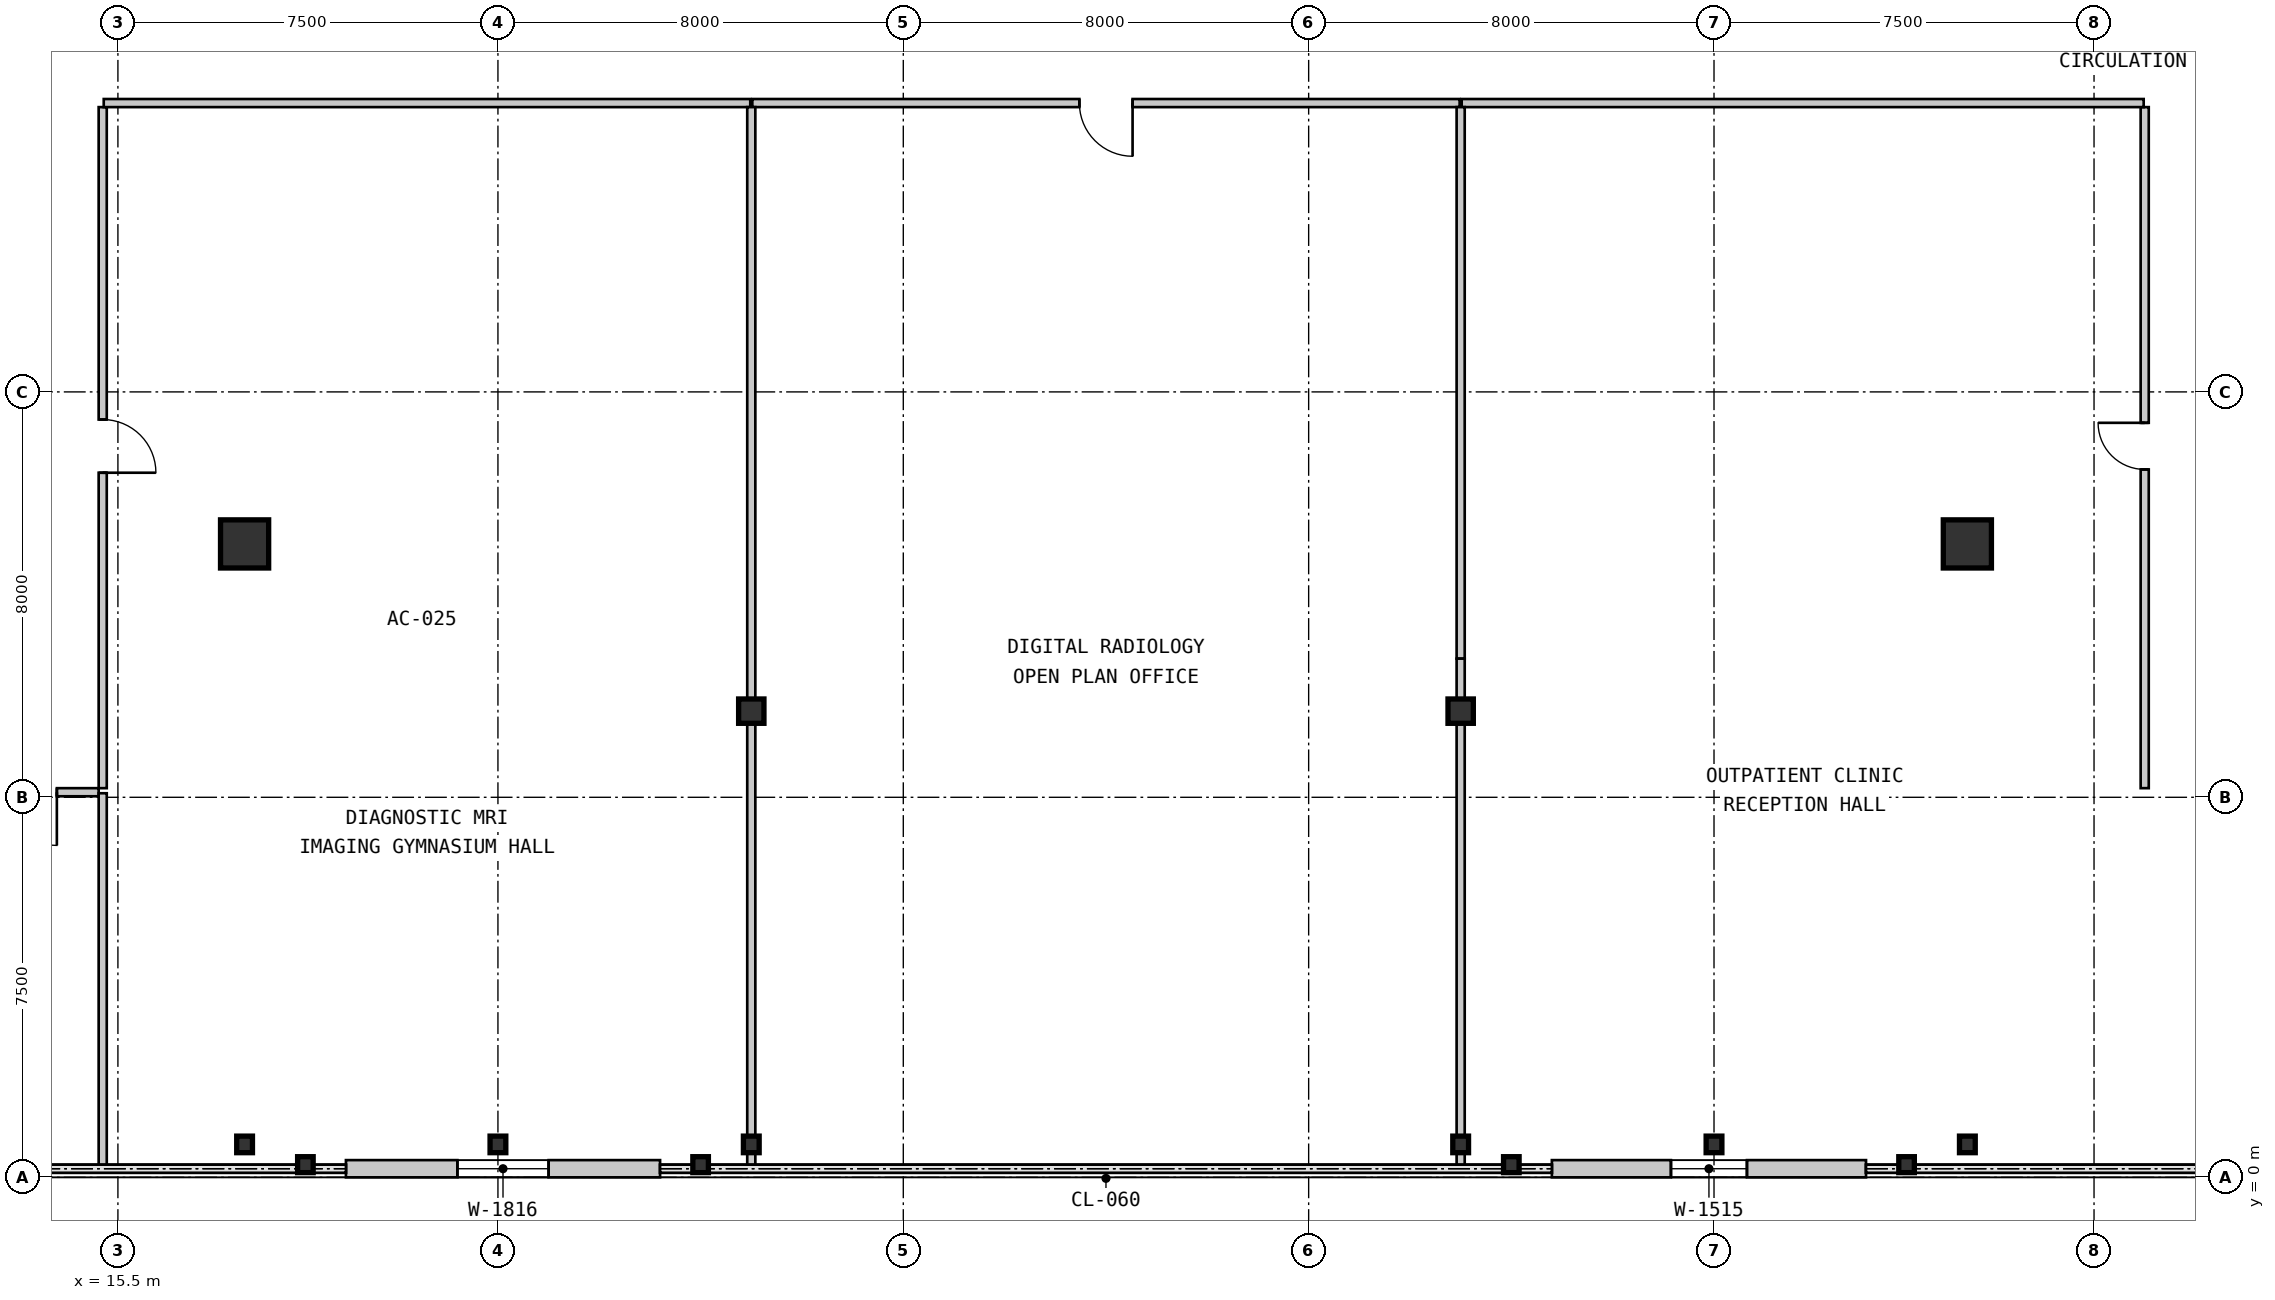
"""IFC4 building model, lengths in metres.
Left out: names, types, materials, properties, quantities, classifications, styles, units other than length and angle.
Written with IfcOpenShell. Run it as: python <this file> out.ifc"""

import sys

from ifc_helpers import new_model, si_unit, direction, frame, frame_2d, origin, origin_2d, place, context, subcontext, project, spatial, rectangle, i_section, extrude, source, transform, mapped, element, fill, save


model = new_model("IFC4")
c1 = context("Model", 3, precision=1e-05, world=origin(), true_north=direction((0.0, 1.0)))
c2 = subcontext(c1, "Body", "Model", "MODEL_VIEW")
j1 = project(units=[si_unit("LENGTHUNIT", "METRE"), si_unit("PLANEANGLEUNIT", "RADIAN")], contexts=[c1])
p1 = place(None, origin())
s1 = spatial("IfcSite", under=j1, at=p1, CompositionType="ELEMENT")
p2 = place(p1, origin())
s2 = spatial("IfcBuilding", under=s1, at=p2, CompositionType="ELEMENT")
p3 = place(p2, frame((0.0, 0.0, 4.55)))
s3 = spatial("IfcBuildingStorey", under=s2, at=p3, CompositionType="ELEMENT", Elevation=4.55)
m1 = source(origin(), c2, "Body", "SweptSolid", [
    extrude(i_section(OverallWidth=0.5, OverallDepth=0.48, WebThickness=0.028, FlangeThickness=0.044, at=origin_2d()), origin(), (0.0, 0.0, 1.0), 3.85),
])
for number, where, z_axis, x_axis in (
    (1, (28.0, 9.2, 0.0), (0.0, 0.0, 1.0), (1.0, 0.0, 0.0)),
    (2, (42.0, 9.2, 0.0), (0.0, 0.0, 1.0), (1.0, 0.0, 0.0)),
):
    element("IfcColumn", number, at=place(p3, frame(where, z_axis=z_axis, x_axis=x_axis)), inside=s3, PredefinedType="COLUMN", context=c2, shape_type="MappedRepresentation", body=[
        mapped(m1, transform((0.0, 0.0, 0.0), scale=1.0)),
    ])
m2 = source(origin(), c2, "Body", "SweptSolid", [
    extrude(rectangle(XDim=0.95, YDim=0.95, at=origin_2d()), origin(), (0.0, 0.0, 1.0), 3.85),
])
for number, where, z_axis, x_axis in (
    (3, (18.0, 12.5, 0.0), (0.0, 0.0, 1.0), (1.0, 0.0, 0.0)),
    (4, (52.0, 12.5, 0.0), (0.0, 0.0, 1.0), (1.0, 0.0, 0.0)),
):
    element("IfcColumn", number, at=place(p3, frame(where, z_axis=z_axis, x_axis=x_axis)), inside=s3, PredefinedType="COLUMN", context=c2, shape_type="MappedRepresentation", body=[
        mapped(m2, transform((0.0, 0.0, 0.0), scale=1.0)),
    ])
m3 = source(origin(), c2, "Body", "SweptSolid", [
    extrude(i_section(OverallWidth=0.311, OverallDepth=0.327, WebThickness=0.016, FlangeThickness=0.025, at=origin_2d()), origin(), (0.0, 0.0, 1.0), 3.85),
])
for number, where, z_axis, x_axis in (
    (5, (28.0, 0.65, 0.0), (0.0, 0.0, 1.0), (1.0, 0.0, 0.0)),
    (6, (42.0, 0.65, 0.0), (0.0, 0.0, 1.0), (1.0, 0.0, 0.0)),
    (7, (18.0, 0.65, 0.0), (0.0, 0.0, 1.0), (1.0, 0.0, 0.0)),
    (8, (23.0, 0.65, 0.0), (0.0, 0.0, 1.0), (1.0, 0.0, 0.0)),
    (9, (47.0, 0.65, 0.0), (0.0, 0.0, 1.0), (1.0, 0.0, 0.0)),
    (10, (52.0, 0.65, 0.0), (0.0, 0.0, 1.0), (1.0, 0.0, 0.0)),
):
    element("IfcColumn", number, at=place(p3, frame(where, z_axis=z_axis, x_axis=x_axis)), inside=s3, PredefinedType="COLUMN", context=c2, shape_type="MappedRepresentation", body=[
        mapped(m3, transform((0.0, 0.0, 0.0), scale=1.0)),
    ])
m4 = source(origin(), c2, "Body", "SweptSolid", [
    extrude(i_section(OverallWidth=0.307, OverallDepth=0.315, WebThickness=0.012, FlangeThickness=0.019, at=origin_2d()), origin(), (0.0, 0.0, 1.0), 3.85),
])
for number, where, z_axis, x_axis in (
    (11, (19.2, 0.25, 0.0), (0.0, 0.0, 1.0), (1.0, 0.0, 0.0)),
    (12, (27.0, 0.25, 0.0), (0.0, 0.0, 1.0), (1.0, 0.0, 0.0)),
    (13, (43.0, 0.25, 0.0), (0.0, 0.0, 1.0), (1.0, 0.0, 0.0)),
    (14, (50.8, 0.25, 0.0), (0.0, 0.0, 1.0), (1.0, 0.0, 0.0)),
):
    element("IfcColumn", number, at=place(p3, frame(where, z_axis=z_axis, x_axis=x_axis)), inside=s3, PredefinedType="PILASTER", context=c2, shape_type="MappedRepresentation", body=[
        mapped(m4, transform((0.0, 0.0, 0.0), scale=1.0)),
    ])
m5 = source(origin(), c2, "Body", "SweptSolid", [
    extrude(rectangle(XDim=6.2, YDim=0.34, at=frame_2d((3.1, 0.0))), origin(), (0.0, 0.0, 1.0), 3.59),
])
p4 = place(p3, frame((20.0, 0.17, 0.0), z_axis=(0.0, 0.0, 1.0), x_axis=(1.0, 0.0, 0.0)))
e15 = element("IfcWall", 15, at=p4, inside=s3, PredefinedType="SOLIDWALL", context=c2, shape_type="MappedRepresentation", body=[
    mapped(m5, transform((0.0, 0.0, 0.0), scale=1.0)),
])
m6 = source(origin(), c2, "Body", "SweptSolid", [
    extrude(rectangle(XDim=1.8, YDim=1.6, at=frame_2d((0.9, 0.8))), frame((0.0, 0.18, 0.0), z_axis=(0.0, -1.0, 0.0), x_axis=(1.0, 0.0, 0.0)), (0.0, 0.0, 1.0), 0.36),
])
p5 = place(p4, frame((2.2, 0.0, 0.9)))
e16 = element("IfcOpeningElement", 16, at=p5, cuts=e15, PredefinedType="OPENING", context=c2, shape_type="MappedRepresentation", body=[
    mapped(m6, transform((0.0, 0.0, 0.0), scale=1.0)),
])
p6 = place(p3, frame((43.8, 0.17, 0.0), z_axis=(0.0, 0.0, 1.0), x_axis=(1.0, 0.0, 0.0)))
e17 = element("IfcWall", 17, at=p6, inside=s3, PredefinedType="SOLIDWALL", context=c2, shape_type="MappedRepresentation", body=[
    mapped(m5, transform((0.0, 0.0, 0.0), scale=1.0)),
])
m7 = source(origin(), c2, "Body", "SweptSolid", [
    extrude(rectangle(XDim=1.5, YDim=1.5, at=frame_2d((0.75, 0.75))), frame((0.0, 0.18, 0.0), z_axis=(0.0, -1.0, 0.0), x_axis=(1.0, 0.0, 0.0)), (0.0, 0.0, 1.0), 0.36),
])
p7 = place(p6, frame((2.35, 0.0, 0.9)))
e18 = element("IfcOpeningElement", 18, at=p7, cuts=e17, PredefinedType="OPENING", context=c2, shape_type="MappedRepresentation", body=[
    mapped(m7, transform((0.0, 0.0, 0.0), scale=1.0)),
])
m8 = source(origin(), c2, "Body", "SweptSolid", [
    extrude(rectangle(XDim=13.44, YDim=0.16, at=frame_2d((6.72, 0.0))), origin(), (0.0, 0.0, 1.0), 3.59),
])
p8 = place(p3, frame((15.2, 21.12, 0.0), z_axis=(0.0, 0.0, 1.0), x_axis=(0.0, -1.0, 0.0)))
e19 = element("IfcWall", 19, at=p8, inside=s3, PredefinedType="PARTITIONING", context=c2, shape_type="MappedRepresentation", body=[
    mapped(m8, transform((0.0, 0.0, 0.0), scale=1.0)),
])
m9 = source(origin(), c2, "Body", "SweptSolid", [
    extrude(rectangle(XDim=1.05, YDim=2.1, at=frame_2d((0.525, 1.05))), frame((0.0, 0.09, 0.0), z_axis=(0.0, -1.0, 0.0), x_axis=(1.0, 0.0, 0.0)), (0.0, 0.0, 1.0), 0.18),
])
p9 = place(p8, frame((6.165, 0.0, 0.0)))
e20 = element("IfcOpeningElement", 20, at=p9, cuts=e19, PredefinedType="OPENING", context=c2, shape_type="MappedRepresentation", body=[
    mapped(m9, transform((0.0, 0.0, 0.0), scale=1.0)),
])
m10 = source(origin(), c2, "Body", "SweptSolid", [
    extrude(rectangle(XDim=12.76, YDim=0.16, at=frame_2d((6.38, 0.0))), origin(), (0.0, 0.0, 1.0), 3.59),
])
p10 = place(p3, frame((27.98, 21.2, 0.0), z_axis=(0.0, 0.0, 1.0), x_axis=(-1.0, 0.0, 0.0)))
e21 = element("IfcWall", 21, at=p10, inside=s3, PredefinedType="PARTITIONING", context=c2, shape_type="MappedRepresentation", body=[
    mapped(m10, transform((0.0, 0.0, 0.0), scale=1.0)),
])
m11 = source(origin(), c2, "Body", "SweptSolid", [
    extrude(rectangle(XDim=13.959, YDim=0.16, at=frame_2d((6.98, 0.0))), origin(), (0.0, 0.0, 1.0), 3.59),
])
p11 = place(p3, frame((41.98, 21.2, 0.0), z_axis=(0.0, 0.0, 1.0), x_axis=(-1.0, 0.0, 0.0)))
e22 = element("IfcWall", 22, at=p11, inside=s3, PredefinedType="PARTITIONING", context=c2, shape_type="MappedRepresentation", body=[
    mapped(m11, transform((0.0, 0.0, 0.0), scale=1.0)),
])
p12 = place(p11, frame((6.455, 0.0, 0.0)))
e23 = element("IfcOpeningElement", 23, at=p12, cuts=e22, PredefinedType="OPENING", context=c2, shape_type="MappedRepresentation", body=[
    mapped(m9, transform((0.0, 0.0, 0.0), scale=1.0)),
])
p13 = place(p3, frame((55.5, 7.68, 0.0), z_axis=(0.0, 0.0, 1.0), x_axis=(0.0, 1.0, 0.0)))
e24 = element("IfcWall", 24, at=p13, inside=s3, PredefinedType="PARTITIONING", context=c2, shape_type="MappedRepresentation", body=[
    mapped(m8, transform((0.0, 0.0, 0.0), scale=1.0)),
])
m12 = source(origin(), c2, "Body", "SweptSolid", [
    extrude(rectangle(XDim=0.92, YDim=2.1, at=frame_2d((0.46, 1.05))), frame((0.0, 0.09, 0.0), z_axis=(0.0, -1.0, 0.0), x_axis=(1.0, 0.0, 0.0)), (0.0, 0.0, 1.0), 0.18),
])
p14 = place(p13, frame((6.29, 0.0, 0.0)))
e25 = element("IfcOpeningElement", 25, at=p14, cuts=e24, PredefinedType="OPENING", context=c2, shape_type="MappedRepresentation", body=[
    mapped(m12, transform((0.0, 0.0, 0.0), scale=1.0)),
])
m13 = source(origin(), c2, "Body", "SweptSolid", [
    extrude(rectangle(XDim=13.459, YDim=0.16, at=frame_2d((6.73, 0.0))), origin(), (0.0, 0.0, 1.0), 3.59),
])
p15 = place(p3, frame((55.48, 21.2, 0.0), z_axis=(0.0, 0.0, 1.0), x_axis=(-1.0, 0.0, 0.0)))
e26 = element("IfcWall", 26, at=p15, inside=s3, PredefinedType="PARTITIONING", context=c2, shape_type="MappedRepresentation", body=[
    mapped(m13, transform((0.0, 0.0, 0.0), scale=1.0)),
])
m14 = source(origin(), c2, "Body", "SweptSolid", [
    extrude(rectangle(XDim=2.67, YDim=0.16, at=frame_2d((1.335, 0.0))), origin(), (0.0, 0.0, 1.0), 3.59),
])
p16 = place(p3, frame((15.12, 7.6, 0.0), z_axis=(0.0, 0.0, 1.0), x_axis=(-1.0, 0.0, 0.0)))
e27 = element("IfcWall", 27, at=p16, inside=s3, PredefinedType="PARTITIONING", context=c2, shape_type="MappedRepresentation", body=[
    mapped(m14, transform((0.0, 0.0, 0.0), scale=1.0)),
])
p17 = place(p16, frame((0.825, 0.0, 0.0)))
e28 = element("IfcOpeningElement", 28, at=p17, cuts=e27, PredefinedType="OPENING", context=c2, shape_type="MappedRepresentation", body=[
    mapped(m9, transform((0.0, 0.0, 0.0), scale=1.0)),
])
m15 = source(origin(), c2, "Body", "SweptSolid", [
    extrude(rectangle(XDim=11.92, YDim=0.16, at=frame_2d((5.96, 0.0))), origin(), (0.0, 0.0, 1.0), 2.988),
])
p18 = place(p3, frame((28.0, 21.12, 0.0), z_axis=(0.0, 0.0, 1.0), x_axis=(0.0, -1.0, 0.0)))
e29 = element("IfcWall", 29, at=p18, inside=s3, PredefinedType="PARTITIONING", context=c2, shape_type="MappedRepresentation", body=[
    mapped(m15, transform((0.0, 0.0, 0.0), scale=1.0)),
])
m16 = source(origin(), c2, "Body", "SweptSolid", [
    extrude(rectangle(XDim=8.55, YDim=0.16, at=frame_2d((4.275, 0.0))), origin(), (0.0, 0.0, 1.0), 3.057),
])
p19 = place(p3, frame((28.0, 9.2, 0.0), z_axis=(0.0, 0.0, 1.0), x_axis=(0.0, -1.0, 0.0)))
e30 = element("IfcWall", 30, at=p19, inside=s3, PredefinedType="PARTITIONING", context=c2, shape_type="MappedRepresentation", body=[
    mapped(m16, transform((0.0, 0.0, 0.0), scale=1.0)),
])
m17 = source(origin(), c2, "Body", "SweptSolid", [
    extrude(rectangle(XDim=0.42, YDim=0.16, at=frame_2d((0.21, 0.0))), origin(), (0.0, 0.0, 1.0), 3.59),
])
p20 = place(p3, frame((28.0, 0.65, 0.0), z_axis=(0.0, 0.0, 1.0), x_axis=(0.0, -1.0, 0.0)))
e31 = element("IfcWall", 31, at=p20, inside=s3, PredefinedType="PARTITIONING", context=c2, shape_type="MappedRepresentation", body=[
    mapped(m17, transform((0.0, 0.0, 0.0), scale=1.0)),
])
m18 = source(origin(), c2, "Body", "SweptSolid", [
    extrude(rectangle(XDim=7.35, YDim=0.16, at=frame_2d((3.675, 0.0))), origin(), (0.0, 0.0, 1.0), 3.59),
])
p21 = place(p3, frame((15.2, 0.23, 0.0), z_axis=(0.0, 0.0, 1.0), x_axis=(0.0, 1.0, 0.0)))
e32 = element("IfcWall", 32, at=p21, inside=s3, PredefinedType="PARTITIONING", context=c2, shape_type="MappedRepresentation", body=[
    mapped(m18, transform((0.0, 0.0, 0.0), scale=1.0)),
])
m19 = source(origin(), c2, "Body", "SweptSolid", [
    extrude(rectangle(XDim=10.884, YDim=0.16, at=frame_2d((5.442, 0.0))), origin(), (0.0, 0.0, 1.0), 3.59),
])
p22 = place(p3, frame((42.0, 21.12, 0.0), z_axis=(0.0, 0.0, 1.0), x_axis=(0.0, -1.0, 0.0)))
e33 = element("IfcWall", 33, at=p22, inside=s3, PredefinedType="PARTITIONING", context=c2, shape_type="MappedRepresentation", body=[
    mapped(m19, transform((0.0, 0.0, 0.0), scale=1.0)),
])
m20 = source(origin(), c2, "Body", "SweptSolid", [
    extrude(rectangle(XDim=1.051, YDim=0.16, at=frame_2d((0.526, 0.0))), origin(), (0.0, 0.0, 1.0), 2.988),
])
p23 = place(p3, frame((42.0, 10.236, 0.0), z_axis=(0.0, 0.0, 1.0), x_axis=(0.0, -1.0, 0.0)))
e34 = element("IfcWall", 34, at=p23, inside=s3, PredefinedType="PARTITIONING", context=c2, shape_type="MappedRepresentation", body=[
    mapped(m20, transform((0.0, 0.0, 0.0), scale=1.0)),
])
m21 = source(origin(), c2, "Body", "SweptSolid", [
    extrude(rectangle(XDim=8.535, YDim=0.16, at=frame_2d((4.268, 0.0))), origin(), (0.0, 0.0, 1.0), 3.057),
])
p24 = place(p3, frame((42.0, 9.185, 0.0), z_axis=(0.0, 0.0, 1.0), x_axis=(0.0, -1.0, 0.0)))
e35 = element("IfcWall", 35, at=p24, inside=s3, PredefinedType="PARTITIONING", context=c2, shape_type="MappedRepresentation", body=[
    mapped(m21, transform((0.0, 0.0, 0.0), scale=1.0)),
])
p25 = place(p3, frame((42.0, 0.65, 0.0), z_axis=(0.0, 0.0, 1.0), x_axis=(0.0, -1.0, 0.0)))
e36 = element("IfcWall", 36, at=p25, inside=s3, PredefinedType="PARTITIONING", context=c2, shape_type="MappedRepresentation", body=[
    mapped(m17, transform((0.0, 0.0, 0.0), scale=1.0)),
])
m22 = source(origin(), c2, "Body", "SweptSolid", [
    extrude(rectangle(XDim=1.8, YDim=1.6, at=frame_2d((0.9, 0.8))), frame((0.0, 0.03, 0.0), z_axis=(0.0, -1.0, 0.0), x_axis=(1.0, 0.0, 0.0)), (0.0, 0.0, 1.0), 0.06),
])
p26 = place(p5, origin())
e37 = element("IfcWindow", 37, at=p26, inside=s3, PartitioningType="SINGLE_PANEL", PredefinedType="WINDOW", context=c2, shape_type="MappedRepresentation", body=[
    mapped(m22, transform((0.0, 0.0, 0.0), scale=1.0)),
])
fill(e16, e37)
m23 = source(origin(), c2, "Body", "SweptSolid", [
    extrude(rectangle(XDim=1.5, YDim=1.5, at=frame_2d((0.75, 0.75))), frame((0.0, 0.03, 0.0), z_axis=(0.0, -1.0, 0.0), x_axis=(1.0, 0.0, 0.0)), (0.0, 0.0, 1.0), 0.06),
])
p27 = place(p7, origin())
e38 = element("IfcWindow", 38, at=p27, inside=s3, PartitioningType="SINGLE_PANEL", PredefinedType="WINDOW", context=c2, shape_type="MappedRepresentation", body=[
    mapped(m23, transform((0.0, 0.0, 0.0), scale=1.0)),
])
fill(e18, e38)
m24 = source(origin(), c2, "Body", "SweptSolid", [
    extrude(rectangle(XDim=1.05, YDim=2.1, at=frame_2d((0.525, 1.05))), frame((0.0, 0.025, 0.0), z_axis=(0.0, -1.0, 0.0), x_axis=(1.0, 0.0, 0.0)), (0.0, 0.0, 1.0), 0.05),
])
p28 = place(p9, origin())
e39 = element("IfcDoor", 39, at=p28, inside=s3, OperationType="SINGLE_SWING_RIGHT", PredefinedType="DOOR", context=c2, shape_type="MappedRepresentation", body=[
    mapped(m24, transform((0.0, 0.0, 0.0), scale=1.0)),
])
fill(e20, e39)
p29 = place(p12, origin())
e40 = element("IfcDoor", 40, at=p29, inside=s3, OperationType="SINGLE_SWING_LEFT", PredefinedType="DOOR", context=c2, shape_type="MappedRepresentation", body=[
    mapped(m24, transform((0.0, 0.0, 0.0), scale=1.0)),
])
fill(e23, e40)
m25 = source(origin(), c2, "Body", "SweptSolid", [
    extrude(rectangle(XDim=0.92, YDim=2.1, at=frame_2d((0.46, 1.05))), frame((0.0, 0.025, 0.0), z_axis=(0.0, -1.0, 0.0), x_axis=(1.0, 0.0, 0.0)), (0.0, 0.0, 1.0), 0.05),
])
p30 = place(p14, origin())
e41 = element("IfcDoor", 41, at=p30, inside=s3, OperationType="SINGLE_SWING_RIGHT", PredefinedType="DOOR", context=c2, shape_type="MappedRepresentation", body=[
    mapped(m25, transform((0.0, 0.0, 0.0), scale=1.0)),
])
fill(e25, e41)
p31 = place(p17, origin())
e42 = element("IfcDoor", 42, at=p31, inside=s3, OperationType="SINGLE_SWING_LEFT", PredefinedType="DOOR", context=c2, shape_type="MappedRepresentation", body=[
    mapped(m24, transform((0.0, 0.0, 0.0), scale=1.0)),
])
fill(e28, e42)
save(model, sys.argv[1])
